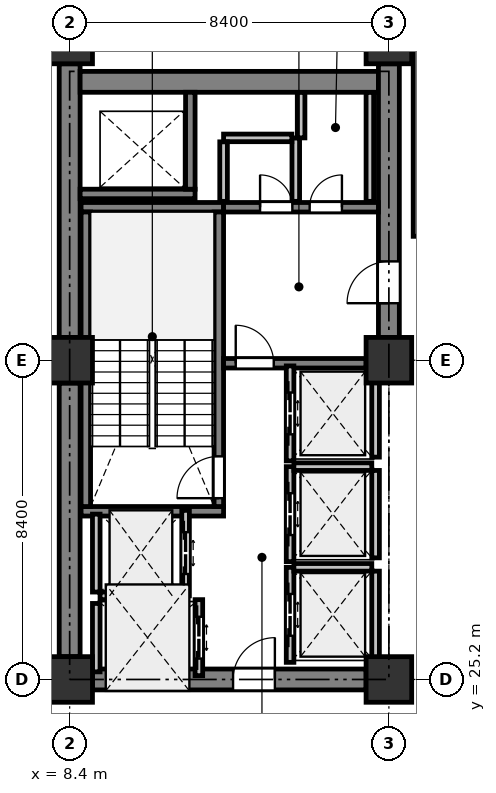
"""IFC4 building model, lengths in metres.
Left out: names, types, materials, properties, quantities, classifications, styles, units other than length and angle.
Written with IfcOpenShell. Run it as: python <this file> out.ifc"""

import sys

from ifc_helpers import new_model, si_unit, direction, frame, frame_2d, origin, origin_2d, place, context, subcontext, project, spatial, rectangle, extrude, element, fill, save


model = new_model("IFC4")
c1 = context("Model", 3, precision=1e-05, world=origin(), true_north=direction((0.0, 1.0)))
c2 = subcontext(c1, "Body", "Model", "MODEL_VIEW")
j1 = project(units=[si_unit("LENGTHUNIT", "METRE"), si_unit("PLANEANGLEUNIT", "RADIAN")], contexts=[c1])
p1 = place(None, origin())
s1 = spatial("IfcSite", under=j1, at=p1, CompositionType="ELEMENT")
p2 = place(p1, origin())
s2 = spatial("IfcBuilding", under=s1, at=p2, CompositionType="ELEMENT")
p3 = place(p2, frame((0.0, 0.0, 96.7)))
s3 = spatial("IfcBuildingStorey", under=s2, at=p3, CompositionType="ELEMENT", Elevation=96.7)
for number, where, z_axis, x_axis in (
    (1, (8.4, 25.2, 0.0), (0.0, 0.0, 1.0), (1.0, 0.0, 0.0)),
    (2, (8.4, 33.6, 0.0), (0.0, 0.0, 1.0), (1.0, 0.0, 0.0)),
    (3, (8.4, 42.0, 0.0), (0.0, 0.0, 1.0), (1.0, 0.0, 0.0)),
    (4, (16.8, 25.2, 0.0), (0.0, 0.0, 1.0), (1.0, 0.0, 0.0)),
    (5, (16.8, 33.6, 0.0), (0.0, 0.0, 1.0), (1.0, 0.0, 0.0)),
    (6, (16.8, 42.0, 0.0), (0.0, 0.0, 1.0), (1.0, 0.0, 0.0)),
):
    element("IfcColumn", number, at=place(p3, frame(where, z_axis=z_axis, x_axis=x_axis)), inside=s3, PredefinedType="COLUMN", context=c2, shape_type="SweptSolid", body=[
        extrude(rectangle(XDim=1.2, YDim=1.2, at=origin_2d()), origin(), (0.0, 0.0, 1.0), 4.1),
    ])
for number, where, z_axis, x_axis in (
    (7, (8.4, 25.8, 0.0), (0.0, 0.0, 1.0), (0.0, 1.0, 0.0)),
    (8, (8.4, 34.2, 0.0), (0.0, 0.0, 1.0), (0.0, 1.0, 0.0)),
):
    element("IfcWall", number, at=place(p3, frame(where, z_axis=z_axis, x_axis=x_axis)), inside=s3, PredefinedType="SHEAR", context=c2, shape_type="SweptSolid", body=[
        extrude(rectangle(XDim=7.2, YDim=0.55, at=frame_2d((3.6, 0.0))), origin(), (0.0, 0.0, 1.0), 3.825),
    ])
p4 = place(p3, frame((8.675, 40.925, 0.0), z_axis=(0.0, 0.0, 1.0), x_axis=(1.0, 0.0, 0.0)))
e9 = element("IfcWall", 9, at=p4, inside=s3, PredefinedType="SHEAR", context=c2, shape_type="SweptSolid", body=[
    extrude(rectangle(XDim=7.85, YDim=0.55, at=frame_2d((3.925, 0.0))), origin(), (0.0, 0.0, 1.0), 3.825),
])
p5 = place(p3, frame((16.8, 34.2, 0.0), z_axis=(0.0, 0.0, 1.0), x_axis=(0.0, 1.0, 0.0)))
e10 = element("IfcWall", 10, at=p5, inside=s3, PredefinedType="SHEAR", context=c2, shape_type="SweptSolid", body=[
    extrude(rectangle(XDim=7.2, YDim=0.55, at=frame_2d((3.6, 0.0))), origin(), (0.0, 0.0, 1.0), 3.825),
])
p6 = place(p5, frame((0.9, 0.0, 0.0)))
e11 = element("IfcOpeningElement", 11, at=p6, cuts=e10, PredefinedType="OPENING", context=c2, shape_type="SweptSolid", body=[
    extrude(rectangle(XDim=1.1, YDim=2.15, at=frame_2d((0.55, 1.075))), frame((0.0, 0.285, 0.0), z_axis=(0.0, -1.0, 0.0), x_axis=(1.0, 0.0, 0.0)), (0.0, 0.0, 1.0), 0.57),
])
p7 = place(p3, frame((9.0, 25.2, 0.0), z_axis=(0.0, 0.0, 1.0), x_axis=(1.0, 0.0, 0.0)))
e12 = element("IfcWall", 12, at=p7, inside=s3, PredefinedType="SHEAR", context=c2, shape_type="SweptSolid", body=[
    extrude(rectangle(XDim=7.2, YDim=0.55, at=frame_2d((3.6, 0.0))), origin(), (0.0, 0.0, 1.0), 3.825),
])
p8 = place(p7, frame((3.7, 0.0, 0.0)))
e13 = element("IfcOpeningElement", 13, at=p8, cuts=e12, PredefinedType="OPENING", context=c2, shape_type="SweptSolid", body=[
    extrude(rectangle(XDim=1.1, YDim=2.15, at=frame_2d((0.55, 1.075))), frame((0.0, 0.285, 0.0), z_axis=(0.0, -1.0, 0.0), x_axis=(1.0, 0.0, 0.0)), (0.0, 0.0, 1.0), 0.57),
])
for number, where, z_axis, x_axis in (
    (14, (12.45, 29.625, 0.0), (0.0, 0.0, 1.0), (-1.0, 0.0, 0.0)),
    (15, (12.45, 37.625, 0.0), (0.0, 0.0, 1.0), (-1.0, 0.0, 0.0)),
):
    element("IfcWall", number, at=place(p3, frame(where, z_axis=z_axis, x_axis=x_axis)), inside=s3, PredefinedType="SHEAR", context=c2, shape_type="SweptSolid", body=[
        extrude(rectangle(XDim=3.75, YDim=0.25, at=frame_2d((1.875, 0.0))), origin(), (0.0, 0.0, 1.0), 3.825),
    ])
p9 = place(p3, frame((12.325, 29.75, 0.0), z_axis=(0.0, 0.0, 1.0), x_axis=(0.0, 1.0, 0.0)))
e16 = element("IfcWall", 16, at=p9, inside=s3, PredefinedType="SHEAR", context=c2, shape_type="SweptSolid", body=[
    extrude(rectangle(XDim=7.75, YDim=0.25, at=frame_2d((3.875, 0.0))), origin(), (0.0, 0.0, 1.0), 3.825),
])
p10 = place(p9, frame((0.22, 0.0, 0.0)))
e17 = element("IfcOpeningElement", 17, at=p10, cuts=e16, PredefinedType="OPENING", context=c2, shape_type="SweptSolid", body=[
    extrude(rectangle(XDim=1.1, YDim=2.15, at=frame_2d((0.55, 1.075))), frame((0.0, 0.135, 0.0), z_axis=(0.0, -1.0, 0.0), x_axis=(1.0, 0.0, 0.0)), (0.0, 0.0, 1.0), 0.27),
])
p11 = place(p3, frame((8.825, 29.75, 0.0), z_axis=(0.0, 0.0, 1.0), x_axis=(0.0, 1.0, 0.0)))
e18 = element("IfcWall", 18, at=p11, inside=s3, PredefinedType="SHEAR", context=c2, shape_type="SweptSolid", body=[
    extrude(rectangle(XDim=7.75, YDim=0.25, at=frame_2d((3.875, 0.0))), origin(), (0.0, 0.0, 1.0), 3.825),
])
p12 = place(p3, frame((8.675, 37.975, 0.0), z_axis=(0.0, 0.0, 1.0), x_axis=(1.0, 0.0, 0.0)))
e19 = element("IfcWall", 19, at=p12, inside=s3, PredefinedType="SHEAR", context=c2, shape_type="SweptSolid", body=[
    extrude(rectangle(XDim=3.025, YDim=0.25, at=frame_2d((1.512, 0.0))), origin(), (0.0, 0.0, 1.0), 3.825),
])
p13 = place(p3, frame((11.575, 38.1, 0.0), z_axis=(0.0, 0.0, 1.0), x_axis=(0.0, 1.0, 0.0)))
e20 = element("IfcWall", 20, at=p13, inside=s3, PredefinedType="SHEAR", context=c2, shape_type="SweptSolid", body=[
    extrude(rectangle(XDim=2.55, YDim=0.25, at=frame_2d((1.275, 0.0))), origin(), (0.0, 0.0, 1.0), 3.825),
])
p14 = place(p3, frame((12.45, 33.52, 0.0), z_axis=(0.0, 0.0, 1.0), x_axis=(1.0, 0.0, 0.0)))
e21 = element("IfcWall", 21, at=p14, inside=s3, PredefinedType="SHEAR", context=c2, shape_type="SweptSolid", body=[
    extrude(rectangle(XDim=3.75, YDim=0.25, at=frame_2d((1.875, 0.0))), origin(), (0.0, 0.0, 1.0), 3.825),
])
p15 = place(p14, frame((0.32, 0.0, 0.0)))
e22 = element("IfcOpeningElement", 22, at=p15, cuts=e21, PredefinedType="OPENING", context=c2, shape_type="SweptSolid", body=[
    extrude(rectangle(XDim=1.0, YDim=2.15, at=frame_2d((0.5, 1.075))), frame((0.0, 0.135, 0.0), z_axis=(0.0, -1.0, 0.0), x_axis=(1.0, 0.0, 0.0)), (0.0, 0.0, 1.0), 0.27),
])
p16 = place(p3, frame((12.45, 37.625, 0.0), z_axis=(0.0, 0.0, 1.0), x_axis=(1.0, 0.0, 0.0)))
e23 = element("IfcWall", 23, at=p16, inside=s3, PredefinedType="SHEAR", context=c2, shape_type="SweptSolid", body=[
    extrude(rectangle(XDim=4.075, YDim=0.25, at=frame_2d((2.038, 0.0))), origin(), (0.0, 0.0, 1.0), 3.825),
])
p17 = place(p16, frame((0.96, 0.0, 0.0)))
e24 = element("IfcOpeningElement", 24, at=p17, cuts=e23, PredefinedType="OPENING", context=c2, shape_type="SweptSolid", body=[
    extrude(rectangle(XDim=0.85, YDim=2.15, at=frame_2d((0.425, 1.075))), frame((0.0, 0.135, 0.0), z_axis=(0.0, -1.0, 0.0), x_axis=(1.0, 0.0, 0.0)), (0.0, 0.0, 1.0), 0.27),
])
p18 = place(p16, frame((2.264, 0.0, 0.0)))
e25 = element("IfcOpeningElement", 25, at=p18, cuts=e23, PredefinedType="OPENING", context=c2, shape_type="SweptSolid", body=[
    extrude(rectangle(XDim=0.85, YDim=2.15, at=frame_2d((0.425, 1.075))), frame((0.0, 0.135, 0.0), z_axis=(0.0, -1.0, 0.0), x_axis=(1.0, 0.0, 0.0)), (0.0, 0.0, 1.0), 0.27),
])
p19 = place(p3, frame((11.45, 27.4, 0.0), z_axis=(0.0, 0.0, 1.0), x_axis=(0.0, 1.0, 0.0)))
e26 = element("IfcWall", 26, at=p19, inside=s3, PredefinedType="PARTITIONING", context=c2, shape_type="SweptSolid", body=[
    extrude(rectangle(XDim=2.25, YDim=0.2, at=frame_2d((1.125, 0.0))), origin(), (0.0, 0.0, 1.0), 3.825),
])
p20 = place(p19, frame((0.575, 0.0, 0.0)))
e27 = element("IfcOpeningElement", 27, at=p20, cuts=e26, PredefinedType="OPENING", context=c2, shape_type="SweptSolid", body=[
    extrude(rectangle(XDim=1.1, YDim=2.2, at=frame_2d((0.55, 1.1))), frame((0.0, 0.11, 0.0), z_axis=(0.0, -1.0, 0.0), x_axis=(1.0, 0.0, 0.0)), (0.0, 0.0, 1.0), 0.22),
])
p21 = place(p3, frame((9.1, 27.5, 0.0), z_axis=(0.0, 0.0, 1.0), x_axis=(0.0, 1.0, 0.0)))
e28 = element("IfcWall", 28, at=p21, inside=s3, PredefinedType="PARTITIONING", context=c2, shape_type="SweptSolid", body=[
    extrude(rectangle(XDim=2.05, YDim=0.2, at=frame_2d((1.025, 0.0))), origin(), (0.0, 0.0, 1.0), 3.825),
])
p22 = place(p3, frame((9.2, 27.4, 0.0), z_axis=(0.0, 0.0, 1.0), x_axis=(1.0, 0.0, 0.0)))
e29 = element("IfcWall", 29, at=p22, inside=s3, PredefinedType="PARTITIONING", context=c2, shape_type="SweptSolid", body=[
    extrude(rectangle(XDim=2.15, YDim=0.2, at=frame_2d((1.075, 0.0))), origin(), (0.0, 0.0, 1.0), 3.825),
])
p23 = place(p3, frame((11.8, 25.3, 0.0), z_axis=(0.0, 0.0, 1.0), x_axis=(0.0, 1.0, 0.0)))
e30 = element("IfcWall", 30, at=p23, inside=s3, PredefinedType="PARTITIONING", context=c2, shape_type="SweptSolid", body=[
    extrude(rectangle(XDim=2.0, YDim=0.2, at=frame_2d((1.0, 0.0))), origin(), (0.0, 0.0, 1.0), 3.825),
])
p24 = place(p23, frame((0.45, 0.0, 0.0)))
e31 = element("IfcOpeningElement", 31, at=p24, cuts=e30, PredefinedType="OPENING", context=c2, shape_type="SweptSolid", body=[
    extrude(rectangle(XDim=1.1, YDim=2.2, at=frame_2d((0.55, 1.1))), frame((0.0, 0.11, 0.0), z_axis=(0.0, -1.0, 0.0), x_axis=(1.0, 0.0, 0.0)), (0.0, 0.0, 1.0), 0.22),
])
p25 = place(p3, frame((9.1, 25.4, 0.0), z_axis=(0.0, 0.0, 1.0), x_axis=(0.0, 1.0, 0.0)))
e32 = element("IfcWall", 32, at=p25, inside=s3, PredefinedType="PARTITIONING", context=c2, shape_type="SweptSolid", body=[
    extrude(rectangle(XDim=1.8, YDim=0.2, at=frame_2d((0.9, 0.0))), origin(), (0.0, 0.0, 1.0), 3.825),
])
p26 = place(p3, frame((14.2, 25.65, 0.0), z_axis=(0.0, 0.0, 1.0), x_axis=(0.0, 1.0, 0.0)))
e33 = element("IfcWall", 33, at=p26, inside=s3, PredefinedType="PARTITIONING", context=c2, shape_type="SweptSolid", body=[
    extrude(rectangle(XDim=2.5, YDim=0.2, at=frame_2d((1.25, 0.0))), origin(), (0.0, 0.0, 1.0), 3.825),
])
p27 = place(p26, frame((0.7, 0.0, 0.0)))
e34 = element("IfcOpeningElement", 34, at=p27, cuts=e33, PredefinedType="OPENING", context=c2, shape_type="SweptSolid", body=[
    extrude(rectangle(XDim=1.1, YDim=2.2, at=frame_2d((0.55, 1.1))), frame((0.0, 0.11, 0.0), z_axis=(0.0, -1.0, 0.0), x_axis=(1.0, 0.0, 0.0)), (0.0, 0.0, 1.0), 0.22),
])
p28 = place(p3, frame((16.45, 25.75, 0.0), z_axis=(0.0, 0.0, 1.0), x_axis=(0.0, 1.0, 0.0)))
e35 = element("IfcWall", 35, at=p28, inside=s3, PredefinedType="PARTITIONING", context=c2, shape_type="SweptSolid", body=[
    extrude(rectangle(XDim=2.3, YDim=0.2, at=frame_2d((1.15, 0.0))), origin(), (0.0, 0.0, 1.0), 3.825),
])
p29 = place(p3, frame((14.3, 28.15, 0.0), z_axis=(0.0, 0.0, 1.0), x_axis=(1.0, 0.0, 0.0)))
e36 = element("IfcWall", 36, at=p29, inside=s3, PredefinedType="PARTITIONING", context=c2, shape_type="SweptSolid", body=[
    extrude(rectangle(XDim=2.05, YDim=0.2, at=frame_2d((1.025, 0.0))), origin(), (0.0, 0.0, 1.0), 3.825),
])
p30 = place(p3, frame((14.2, 28.3, 0.0), z_axis=(0.0, 0.0, 1.0), x_axis=(0.0, 1.0, 0.0)))
e37 = element("IfcWall", 37, at=p30, inside=s3, PredefinedType="PARTITIONING", context=c2, shape_type="SweptSolid", body=[
    extrude(rectangle(XDim=2.5, YDim=0.2, at=frame_2d((1.25, 0.0))), origin(), (0.0, 0.0, 1.0), 3.825),
])
p31 = place(p30, frame((0.7, 0.0, 0.0)))
e38 = element("IfcOpeningElement", 38, at=p31, cuts=e37, PredefinedType="OPENING", context=c2, shape_type="SweptSolid", body=[
    extrude(rectangle(XDim=1.1, YDim=2.2, at=frame_2d((0.55, 1.1))), frame((0.0, 0.11, 0.0), z_axis=(0.0, -1.0, 0.0), x_axis=(1.0, 0.0, 0.0)), (0.0, 0.0, 1.0), 0.22),
])
p32 = place(p3, frame((16.45, 28.4, 0.0), z_axis=(0.0, 0.0, 1.0), x_axis=(0.0, 1.0, 0.0)))
e39 = element("IfcWall", 39, at=p32, inside=s3, PredefinedType="PARTITIONING", context=c2, shape_type="SweptSolid", body=[
    extrude(rectangle(XDim=2.3, YDim=0.2, at=frame_2d((1.15, 0.0))), origin(), (0.0, 0.0, 1.0), 3.825),
])
p33 = place(p3, frame((14.3, 30.8, 0.0), z_axis=(0.0, 0.0, 1.0), x_axis=(1.0, 0.0, 0.0)))
e40 = element("IfcWall", 40, at=p33, inside=s3, PredefinedType="PARTITIONING", context=c2, shape_type="SweptSolid", body=[
    extrude(rectangle(XDim=2.05, YDim=0.2, at=frame_2d((1.025, 0.0))), origin(), (0.0, 0.0, 1.0), 3.825),
])
p34 = place(p3, frame((14.2, 30.95, 0.0), z_axis=(0.0, 0.0, 1.0), x_axis=(0.0, 1.0, 0.0)))
e41 = element("IfcWall", 41, at=p34, inside=s3, PredefinedType="PARTITIONING", context=c2, shape_type="SweptSolid", body=[
    extrude(rectangle(XDim=2.5, YDim=0.2, at=frame_2d((1.25, 0.0))), origin(), (0.0, 0.0, 1.0), 3.825),
])
p35 = place(p34, frame((0.7, 0.0, 0.0)))
e42 = element("IfcOpeningElement", 42, at=p35, cuts=e41, PredefinedType="OPENING", context=c2, shape_type="SweptSolid", body=[
    extrude(rectangle(XDim=1.1, YDim=2.2, at=frame_2d((0.55, 1.1))), frame((0.0, 0.11, 0.0), z_axis=(0.0, -1.0, 0.0), x_axis=(1.0, 0.0, 0.0)), (0.0, 0.0, 1.0), 0.22),
])
p36 = place(p3, frame((16.45, 31.05, 0.0), z_axis=(0.0, 0.0, 1.0), x_axis=(0.0, 1.0, 0.0)))
e43 = element("IfcWall", 43, at=p36, inside=s3, PredefinedType="PARTITIONING", context=c2, shape_type="SweptSolid", body=[
    extrude(rectangle(XDim=2.3, YDim=0.2, at=frame_2d((1.15, 0.0))), origin(), (0.0, 0.0, 1.0), 3.825),
])
p37 = place(p3, frame((14.35, 37.78, 0.0), z_axis=(0.0, 0.0, 1.0), x_axis=(0.0, 1.0, 0.0)))
e44 = element("IfcWall", 44, at=p37, inside=s3, PredefinedType="PARTITIONING", context=c2, shape_type="SweptSolid", body=[
    extrude(rectangle(XDim=1.67, YDim=0.2, at=frame_2d((0.835, 0.0))), origin(), (0.0, 0.0, 1.0), 2.725),
])
p38 = place(p3, frame((14.246, 39.45, 0.0), z_axis=(0.0, 0.0, 1.0), x_axis=(-1.0, 0.0, 0.0)))
e45 = element("IfcWall", 45, at=p38, inside=s3, PredefinedType="PARTITIONING", context=c2, shape_type="SweptSolid", body=[
    extrude(rectangle(XDim=1.796, YDim=0.2, at=frame_2d((0.898, 0.0))), origin(), (0.0, 0.0, 1.0), 2.725),
])
p39 = place(p3, frame((12.45, 39.346, 0.0), z_axis=(0.0, 0.0, 1.0), x_axis=(0.0, -1.0, 0.0)))
e46 = element("IfcWall", 46, at=p39, inside=s3, PredefinedType="PARTITIONING", context=c2, shape_type="SweptSolid", body=[
    extrude(rectangle(XDim=1.566, YDim=0.2, at=frame_2d((0.783, 0.0))), origin(), (0.0, 0.0, 1.0), 2.725),
])
p40 = place(p3, frame((16.3, 37.78, 0.0), z_axis=(0.0, 0.0, 1.0), x_axis=(0.0, 1.0, 0.0)))
e47 = element("IfcWall", 47, at=p40, inside=s3, PredefinedType="PARTITIONING", context=c2, shape_type="SweptSolid", body=[
    extrude(rectangle(XDim=2.866, YDim=0.2, at=frame_2d((1.433, 0.0))), origin(), (0.0, 0.0, 1.0), 2.725),
])
p41 = place(p3, frame((14.49, 40.646, 0.0), z_axis=(0.0, 0.0, 1.0), x_axis=(0.0, -1.0, 0.0)))
e48 = element("IfcWall", 48, at=p41, inside=s3, PredefinedType="PARTITIONING", context=c2, shape_type="SweptSolid", body=[
    extrude(rectangle(XDim=1.196, YDim=0.2, at=frame_2d((0.598, 0.0))), origin(), (0.0, 0.0, 1.0), 2.725),
])
p42 = place(p3, frame((17.54, 36.86, 0.0), z_axis=(0.0, 0.0, 1.0), x_axis=(0.0, 1.0, 0.0)))
e49 = element("IfcWall", 49, at=p42, inside=s3, PredefinedType="PARTITIONING", context=c2, shape_type="SweptSolid", body=[
    extrude(rectangle(XDim=6.14, YDim=0.2, at=frame_2d((3.07, 0.0))), origin(), (0.0, 0.0, 1.0), 3.292),
])
p43 = place(p6, origin())
e50 = element("IfcDoor", 50, at=p43, inside=s3, OperationType="SINGLE_SWING_LEFT", PredefinedType="DOOR", context=c2, shape_type="SweptSolid", body=[
    extrude(rectangle(XDim=1.1, YDim=2.15, at=frame_2d((0.55, 1.075))), frame((0.0, 0.025, 0.0), z_axis=(0.0, -1.0, 0.0), x_axis=(1.0, 0.0, 0.0)), (0.0, 0.0, 1.0), 0.05),
])
fill(e11, e50)
p44 = place(p8, origin())
e51 = element("IfcDoor", 51, at=p44, inside=s3, OperationType="SINGLE_SWING_RIGHT", PredefinedType="DOOR", context=c2, shape_type="SweptSolid", body=[
    extrude(rectangle(XDim=1.1, YDim=2.15, at=frame_2d((0.55, 1.075))), frame((0.0, 0.025, 0.0), z_axis=(0.0, -1.0, 0.0), x_axis=(1.0, 0.0, 0.0)), (0.0, 0.0, 1.0), 0.05),
])
fill(e13, e51)
p45 = place(p10, origin())
e52 = element("IfcDoor", 52, at=p45, inside=s3, OperationType="SINGLE_SWING_LEFT", PredefinedType="DOOR", context=c2, shape_type="SweptSolid", body=[
    extrude(rectangle(XDim=1.1, YDim=2.15, at=frame_2d((0.55, 1.075))), frame((0.0, 0.025, 0.0), z_axis=(0.0, -1.0, 0.0), x_axis=(1.0, 0.0, 0.0)), (0.0, 0.0, 1.0), 0.05),
])
fill(e17, e52)
p46 = place(p15, origin())
e53 = element("IfcDoor", 53, at=p46, inside=s3, OperationType="SINGLE_SWING_LEFT", PredefinedType="DOOR", context=c2, shape_type="SweptSolid", body=[
    extrude(rectangle(XDim=1.0, YDim=2.15, at=frame_2d((0.5, 1.075))), frame((0.0, 0.025, 0.0), z_axis=(0.0, -1.0, 0.0), x_axis=(1.0, 0.0, 0.0)), (0.0, 0.0, 1.0), 0.05),
])
fill(e22, e53)
p47 = place(p20, origin())
e54 = element("IfcDoor", 54, at=p47, inside=s3, OperationType="DOUBLE_DOOR_SLIDING", PredefinedType="DOOR", context=c2, shape_type="SweptSolid", body=[
    extrude(rectangle(XDim=1.1, YDim=2.2, at=frame_2d((0.55, 1.1))), frame((0.0, 0.025, 0.0), z_axis=(0.0, -1.0, 0.0), x_axis=(1.0, 0.0, 0.0)), (0.0, 0.0, 1.0), 0.05),
])
fill(e27, e54)
p48 = place(p24, origin())
e55 = element("IfcDoor", 55, at=p48, inside=s3, OperationType="DOUBLE_DOOR_SLIDING", PredefinedType="DOOR", context=c2, shape_type="SweptSolid", body=[
    extrude(rectangle(XDim=1.1, YDim=2.2, at=frame_2d((0.55, 1.1))), frame((0.0, 0.025, 0.0), z_axis=(0.0, -1.0, 0.0), x_axis=(1.0, 0.0, 0.0)), (0.0, 0.0, 1.0), 0.05),
])
fill(e31, e55)
p49 = place(p27, origin())
e56 = element("IfcDoor", 56, at=p49, inside=s3, OperationType="DOUBLE_DOOR_SLIDING", PredefinedType="DOOR", context=c2, shape_type="SweptSolid", body=[
    extrude(rectangle(XDim=1.1, YDim=2.2, at=frame_2d((0.55, 1.1))), frame((0.0, 0.025, 0.0), z_axis=(0.0, -1.0, 0.0), x_axis=(1.0, 0.0, 0.0)), (0.0, 0.0, 1.0), 0.05),
])
fill(e34, e56)
p50 = place(p31, origin())
e57 = element("IfcDoor", 57, at=p50, inside=s3, OperationType="DOUBLE_DOOR_SLIDING", PredefinedType="DOOR", context=c2, shape_type="SweptSolid", body=[
    extrude(rectangle(XDim=1.1, YDim=2.2, at=frame_2d((0.55, 1.1))), frame((0.0, 0.025, 0.0), z_axis=(0.0, -1.0, 0.0), x_axis=(1.0, 0.0, 0.0)), (0.0, 0.0, 1.0), 0.05),
])
fill(e38, e57)
p51 = place(p35, origin())
e58 = element("IfcDoor", 58, at=p51, inside=s3, OperationType="DOUBLE_DOOR_SLIDING", PredefinedType="DOOR", context=c2, shape_type="SweptSolid", body=[
    extrude(rectangle(XDim=1.1, YDim=2.2, at=frame_2d((0.55, 1.1))), frame((0.0, 0.025, 0.0), z_axis=(0.0, -1.0, 0.0), x_axis=(1.0, 0.0, 0.0)), (0.0, 0.0, 1.0), 0.05),
])
fill(e42, e58)
p52 = place(p17, origin())
e59 = element("IfcDoor", 59, at=p52, inside=s3, OperationType="SINGLE_SWING_LEFT", PredefinedType="DOOR", context=c2, shape_type="SweptSolid", body=[
    extrude(rectangle(XDim=0.85, YDim=2.15, at=frame_2d((0.425, 1.075))), frame((0.0, 0.025, 0.0), z_axis=(0.0, -1.0, 0.0), x_axis=(1.0, 0.0, 0.0)), (0.0, 0.0, 1.0), 0.05),
])
fill(e24, e59)
p53 = place(p18, origin())
e60 = element("IfcDoor", 60, at=p53, inside=s3, OperationType="SINGLE_SWING_RIGHT", PredefinedType="DOOR", context=c2, shape_type="SweptSolid", body=[
    extrude(rectangle(XDim=0.85, YDim=2.15, at=frame_2d((0.425, 1.075))), frame((0.0, 0.025, 0.0), z_axis=(0.0, -1.0, 0.0), x_axis=(1.0, 0.0, 0.0)), (0.0, 0.0, 1.0), 0.05),
])
fill(e25, e60)
save(model, sys.argv[1])
